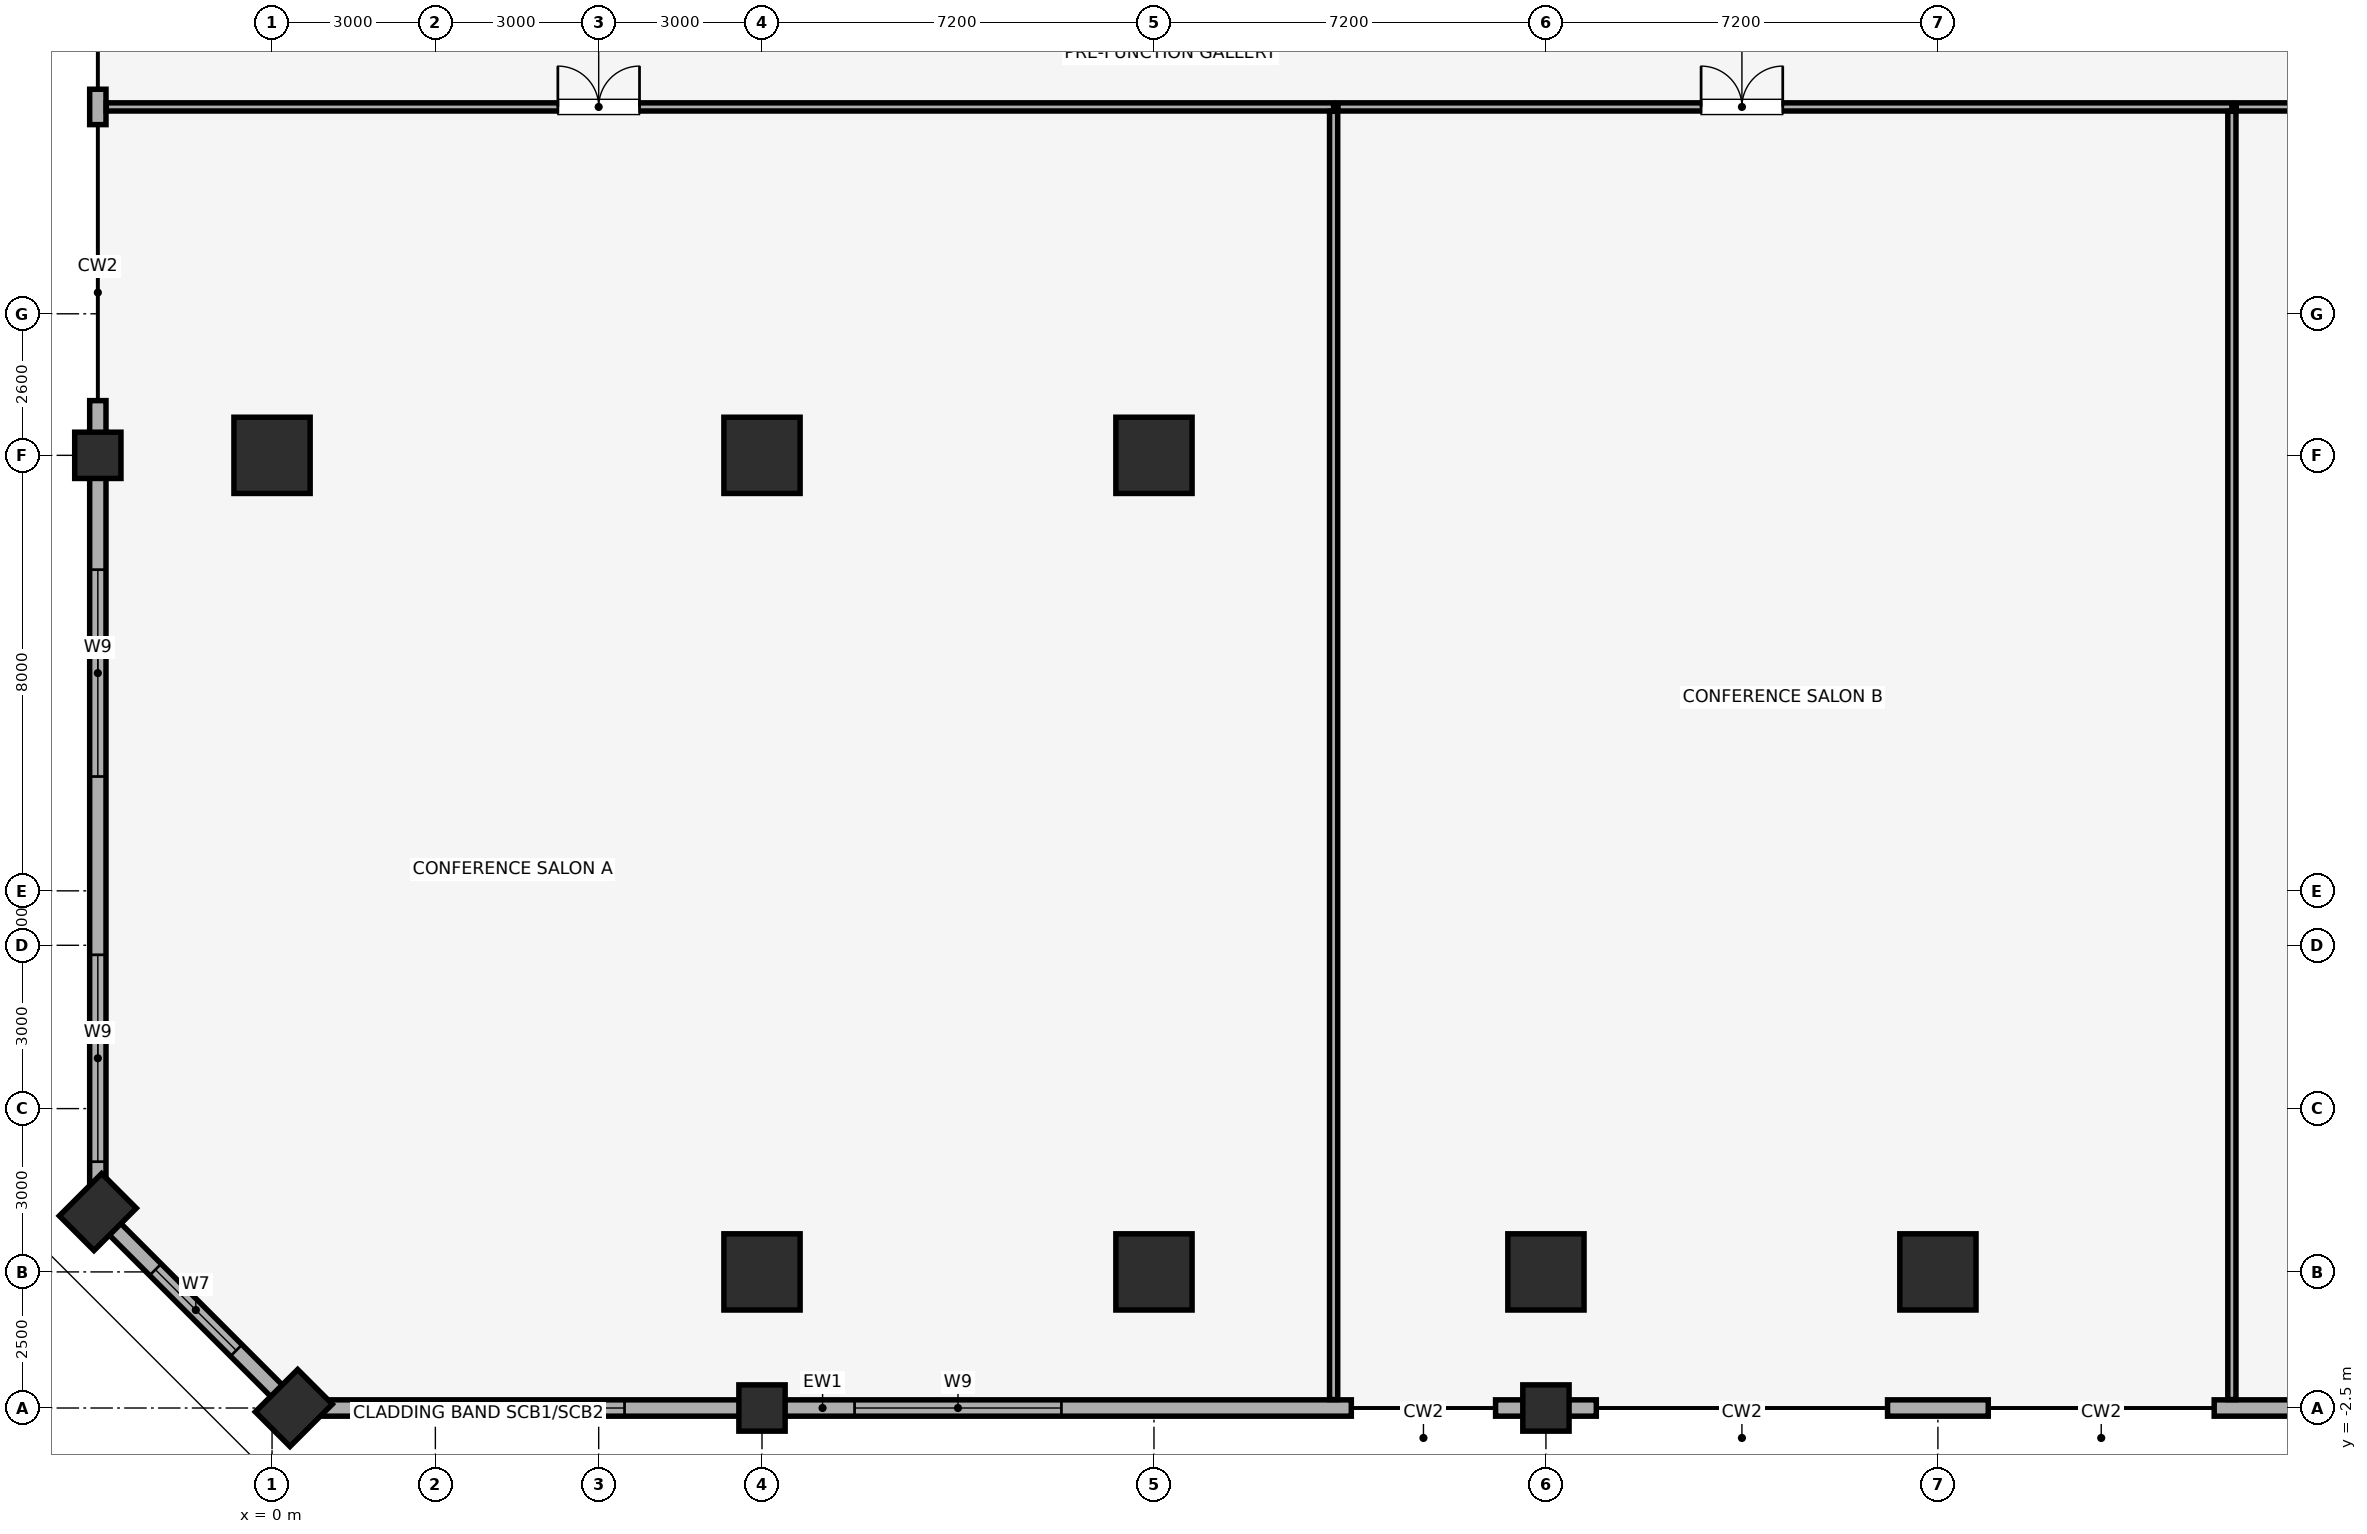
"""IFC4 building model, lengths in metres.
Left out: names, types, materials, properties, quantities, classifications, styles, units other than length and angle.
Written with IfcOpenShell. Run it as: python <this file> out.ifc"""

import sys

from ifc_helpers import new_model, si_unit, direction, frame, frame_2d, origin, origin_2d, place, context, subcontext, project, spatial, rectangle, extrude, element, fill, save


model = new_model("IFC4")
c1 = context("Model", 3, precision=1e-05, world=origin(), true_north=direction((0.0, 1.0)))
c2 = subcontext(c1, "Body", "Model", "MODEL_VIEW")
j1 = project(units=[si_unit("LENGTHUNIT", "METRE"), si_unit("PLANEANGLEUNIT", "RADIAN")], contexts=[c1])
p1 = place(None, origin())
s1 = spatial("IfcSite", under=j1, at=p1, CompositionType="ELEMENT")
p2 = place(p1, origin())
s2 = spatial("IfcBuilding", under=s1, at=p2, CompositionType="ELEMENT")
p3 = place(p2, frame((0.0, 0.0, 26.0)))
s3 = spatial("IfcBuildingStorey", under=s2, at=p3, CompositionType="ELEMENT", Elevation=26.0)
for number, where, z_axis, x_axis in (
    (1, (9.0, -2.5, 0.0), (0.0, 0.0, 1.0), (1.0, 0.0, 0.0)),
    (2, (23.4, -2.5, 0.0), (0.0, 0.0, 1.0), (1.0, 0.0, 0.0)),
    (3, (-3.2, 15.0, 0.0), (0.0, 0.0, 1.0), (1.0, 0.0, 0.0)),
):
    element("IfcColumn", number, at=place(p3, frame(where, z_axis=z_axis, x_axis=x_axis)), inside=s3, PredefinedType="COLUMN", context=c2, shape_type="SweptSolid", body=[
        extrude(rectangle(XDim=0.85, YDim=0.85, at=origin_2d()), origin(), (0.0, 0.0, 1.0), 5.16),
    ])
for number, where, z_axis, x_axis in (
    (4, (0.4, -2.5, 0.0), (0.0, 0.0, 1.0), (0.707, 0.707, 0.0)),
    (5, (-3.2, 1.1, 0.0), (0.0, 0.0, 1.0), (0.707, 0.707, 0.0)),
):
    element("IfcColumn", number, at=place(p3, frame(where, z_axis=z_axis, x_axis=x_axis)), inside=s3, PredefinedType="PILASTER", context=c2, shape_type="SweptSolid", body=[
        extrude(rectangle(XDim=1.1, YDim=0.9, at=origin_2d()), origin(), (0.0, 0.0, 1.0), 5.16),
    ])
for number, where, z_axis, x_axis in (
    (6, (9.0, 0.0, 0.0), (0.0, 0.0, 1.0), (1.0, 0.0, 0.0)),
    (7, (16.2, 0.0, 0.0), (0.0, 0.0, 1.0), (1.0, 0.0, 0.0)),
    (8, (23.4, 0.0, 0.0), (0.0, 0.0, 1.0), (1.0, 0.0, 0.0)),
    (9, (30.6, 0.0, 0.0), (0.0, 0.0, 1.0), (1.0, 0.0, 0.0)),
    (10, (9.0, 15.0, 0.0), (0.0, 0.0, 1.0), (1.0, 0.0, 0.0)),
    (11, (16.2, 15.0, 0.0), (0.0, 0.0, 1.0), (1.0, 0.0, 0.0)),
    (12, (0.0, 15.0, 0.0), (0.0, 0.0, 1.0), (1.0, 0.0, 0.0)),
):
    element("IfcColumn", number, at=place(p3, frame(where, z_axis=z_axis, x_axis=x_axis)), inside=s3, PredefinedType="COLUMN", context=c2, shape_type="SweptSolid", body=[
        extrude(rectangle(XDim=1.4, YDim=1.4, at=origin_2d()), origin(), (0.0, 0.0, 1.0), 5.16),
    ])
p4 = place(p3, frame((0.4, -2.5, 0.0), z_axis=(0.0, 0.0, 1.0), x_axis=(1.0, 0.0, 0.0)))
e13 = element("IfcWall", 13, at=p4, inside=s3, PredefinedType="SOLIDWALL", context=c2, shape_type="SweptSolid", body=[
    extrude(rectangle(XDim=19.425, YDim=0.3, at=frame_2d((9.712, 0.0))), origin(), (0.0, 0.0, 1.0), 5.12),
])
p5 = place(p4, frame((2.275, 0.0, 0.85)))
e14 = element("IfcOpeningElement", 14, at=p5, cuts=e13, PredefinedType="OPENING", context=c2, shape_type="SweptSolid", body=[
    extrude(rectangle(XDim=3.8, YDim=2.2, at=frame_2d((1.9, 1.1))), frame((0.0, 0.16, 0.0), z_axis=(0.0, -1.0, 0.0), x_axis=(1.0, 0.0, 0.0)), (0.0, 0.0, 1.0), 0.32),
])
p6 = place(p4, frame((10.3, 0.0, 0.85)))
e15 = element("IfcOpeningElement", 15, at=p6, cuts=e13, PredefinedType="OPENING", context=c2, shape_type="SweptSolid", body=[
    extrude(rectangle(XDim=3.8, YDim=2.2, at=frame_2d((1.9, 1.1))), frame((0.0, 0.16, 0.0), z_axis=(0.0, -1.0, 0.0), x_axis=(1.0, 0.0, 0.0)), (0.0, 0.0, 1.0), 0.32),
])
for number, where, z_axis, x_axis in (
    (16, (22.475, -2.5, 0.0), (0.0, 0.0, 1.0), (1.0, 0.0, 0.0)),
    (17, (29.675, -2.5, 0.0), (0.0, 0.0, 1.0), (1.0, 0.0, 0.0)),
):
    element("IfcWall", number, at=place(p3, frame(where, z_axis=z_axis, x_axis=x_axis)), inside=s3, PredefinedType="SOLIDWALL", context=c2, shape_type="SweptSolid", body=[
        extrude(rectangle(XDim=1.85, YDim=0.3, at=frame_2d((0.925, 0.0))), origin(), (0.0, 0.0, 1.0), 5.12),
    ])
p7 = place(p3, frame((35.675, -2.5, 0.0), z_axis=(0.0, 0.0, 1.0), x_axis=(1.0, 0.0, 0.0)))
e18 = element("IfcWall", 18, at=p7, inside=s3, PredefinedType="SOLIDWALL", context=c2, shape_type="SweptSolid", body=[
    extrude(rectangle(XDim=3.05, YDim=0.3, at=frame_2d((1.525, 0.0))), origin(), (0.0, 0.0, 1.0), 5.12),
])
p8 = place(p3, frame((-3.2, 21.725, 0.0), z_axis=(0.0, 0.0, 1.0), x_axis=(0.0, -1.0, 0.0)))
e19 = element("IfcWall", 19, at=p8, inside=s3, PredefinedType="SOLIDWALL", context=c2, shape_type="SweptSolid", body=[
    extrude(rectangle(XDim=0.65, YDim=0.3, at=frame_2d((0.325, 0.0))), origin(), (0.0, 0.0, 1.0), 5.12),
])
p9 = place(p3, frame((-3.2, 16.005, 0.0), z_axis=(0.0, 0.0, 1.0), x_axis=(0.0, -1.0, 0.0)))
e20 = element("IfcWall", 20, at=p9, inside=s3, PredefinedType="SOLIDWALL", context=c2, shape_type="SweptSolid", body=[
    extrude(rectangle(XDim=14.905, YDim=0.3, at=frame_2d((7.452, 0.0))), origin(), (0.0, 0.0, 1.0), 5.12),
])
p10 = place(p9, frame((10.18, 0.0, 0.85)))
e21 = element("IfcOpeningElement", 21, at=p10, cuts=e20, PredefinedType="OPENING", context=c2, shape_type="SweptSolid", body=[
    extrude(rectangle(XDim=3.8, YDim=2.2, at=frame_2d((1.9, 1.1))), frame((0.0, 0.16, 0.0), z_axis=(0.0, -1.0, 0.0), x_axis=(1.0, 0.0, 0.0)), (0.0, 0.0, 1.0), 0.32),
])
p11 = place(p9, frame((3.105, 0.0, 0.85)))
e22 = element("IfcOpeningElement", 22, at=p11, cuts=e20, PredefinedType="OPENING", context=c2, shape_type="SweptSolid", body=[
    extrude(rectangle(XDim=3.8, YDim=2.2, at=frame_2d((1.9, 1.1))), frame((0.0, 0.16, 0.0), z_axis=(0.0, -1.0, 0.0), x_axis=(1.0, 0.0, 0.0)), (0.0, 0.0, 1.0), 0.32),
])
p12 = place(p3, frame((-3.2, 1.1, 0.0), z_axis=(0.0, 0.0, 1.0), x_axis=(0.707082803744, -0.707130757816, 0.0)))
e23 = element("IfcWall", 23, at=p12, inside=s3, PredefinedType="SOLIDWALL", context=c2, shape_type="SweptSolid", body=[
    extrude(rectangle(XDim=5.091, YDim=0.3, at=frame_2d((2.545, 0.0))), origin(), (0.0, 0.0, 1.0), 5.12),
])
p13 = place(p12, frame((1.496, 0.0, 0.85)))
e24 = element("IfcOpeningElement", 24, at=p13, cuts=e23, PredefinedType="OPENING", context=c2, shape_type="SweptSolid", body=[
    extrude(rectangle(XDim=2.1, YDim=1.6, at=frame_2d((1.05, 0.8))), frame((0.0, 0.16, 0.0), z_axis=(0.0, -1.0, 0.0), x_axis=(1.0, 0.0, 0.0)), (0.0, 0.0, 1.0), 0.32),
])
p14 = place(p3, frame((-3.045, 21.4, 0.0), z_axis=(0.0, 0.0, 1.0), x_axis=(1.0, 0.0, 0.0)))
e25 = element("IfcWall", 25, at=p14, inside=s3, PredefinedType="PARTITIONING", context=c2, shape_type="SweptSolid", body=[
    extrude(rectangle(XDim=22.545, YDim=0.15, at=frame_2d((11.272, 0.0))), origin(), (0.0, 0.0, 1.0), 5.12),
])
p15 = place(p14, frame((8.295, 0.0, 0.0)))
e26 = element("IfcOpeningElement", 26, at=p15, cuts=e25, PredefinedType="OPENING", context=c2, shape_type="SweptSolid", body=[
    extrude(rectangle(XDim=1.5, YDim=2.25, at=frame_2d((0.75, 1.125))), frame((0.0, 0.085, 0.0), z_axis=(0.0, -1.0, 0.0), x_axis=(1.0, 0.0, 0.0)), (0.0, 0.0, 1.0), 0.17),
])
p16 = place(p3, frame((19.5, -2.345, 0.0), z_axis=(0.0, 0.0, 1.0), x_axis=(0.0, 1.0, 0.0)))
e27 = element("IfcWall", 27, at=p16, inside=s3, PredefinedType="PARTITIONING", context=c2, shape_type="SweptSolid", body=[
    extrude(rectangle(XDim=23.665, YDim=0.15, at=frame_2d((11.833, 0.0))), origin(), (0.0, 0.0, 1.0), 5.12),
])
p17 = place(p3, frame((19.58, 21.4, 0.0), z_axis=(0.0, 0.0, 1.0), x_axis=(1.0, 0.0, 0.0)))
e28 = element("IfcWall", 28, at=p17, inside=s3, PredefinedType="PARTITIONING", context=c2, shape_type="SweptSolid", body=[
    extrude(rectangle(XDim=16.42, YDim=0.15, at=frame_2d((8.21, 0.0))), origin(), (0.0, 0.0, 1.0), 5.12),
])
p18 = place(p17, frame((6.67, 0.0, 0.0)))
e29 = element("IfcOpeningElement", 29, at=p18, cuts=e28, PredefinedType="OPENING", context=c2, shape_type="SweptSolid", body=[
    extrude(rectangle(XDim=1.5, YDim=2.25, at=frame_2d((0.75, 1.125))), frame((0.0, 0.085, 0.0), z_axis=(0.0, -1.0, 0.0), x_axis=(1.0, 0.0, 0.0)), (0.0, 0.0, 1.0), 0.17),
])
p19 = place(p3, frame((36.0, -2.345, 0.0), z_axis=(0.0, 0.0, 1.0), x_axis=(0.0, 1.0, 0.0)))
e30 = element("IfcWall", 30, at=p19, inside=s3, PredefinedType="PARTITIONING", context=c2, shape_type="SweptSolid", body=[
    extrude(rectangle(XDim=23.665, YDim=0.15, at=frame_2d((11.833, 0.0))), origin(), (0.0, 0.0, 1.0), 5.12),
])
p20 = place(p3, frame((36.08, 21.4, 0.0), z_axis=(0.0, 0.0, 1.0), x_axis=(1.0, 0.0, 0.0)))
e31 = element("IfcWall", 31, at=p20, inside=s3, PredefinedType="PARTITIONING", context=c2, shape_type="SweptSolid", body=[
    extrude(rectangle(XDim=16.42, YDim=0.15, at=frame_2d((8.21, 0.0))), origin(), (0.0, 0.0, 1.0), 5.12),
])
p21 = place(p20, frame((5.17, 0.0, 0.0)))
e32 = element("IfcOpeningElement", 32, at=p21, cuts=e31, PredefinedType="OPENING", context=c2, shape_type="SweptSolid", body=[
    extrude(rectangle(XDim=1.5, YDim=2.25, at=frame_2d((0.75, 1.125))), frame((0.0, 0.085, 0.0), z_axis=(0.0, -1.0, 0.0), x_axis=(1.0, 0.0, 0.0)), (0.0, 0.0, 1.0), 0.17),
])
p22 = place(p13, origin())
e33 = element("IfcWindow", 33, at=p22, inside=s3, PartitioningType="SINGLE_PANEL", PredefinedType="WINDOW", context=c2, shape_type="SweptSolid", body=[
    extrude(rectangle(XDim=2.1, YDim=1.6, at=frame_2d((1.05, 0.8))), frame((0.0, 0.03, 0.0), z_axis=(0.0, -1.0, 0.0), x_axis=(1.0, 0.0, 0.0)), (0.0, 0.0, 1.0), 0.06),
])
fill(e24, e33)
p23 = place(p5, origin())
e34 = element("IfcWindow", 34, at=p23, inside=s3, PartitioningType="SINGLE_PANEL", PredefinedType="WINDOW", context=c2, shape_type="SweptSolid", body=[
    extrude(rectangle(XDim=3.8, YDim=2.2, at=frame_2d((1.9, 1.1))), frame((0.0, 0.03, 0.0), z_axis=(0.0, -1.0, 0.0), x_axis=(1.0, 0.0, 0.0)), (0.0, 0.0, 1.0), 0.06),
])
fill(e14, e34)
p24 = place(p6, origin())
e35 = element("IfcWindow", 35, at=p24, inside=s3, PartitioningType="SINGLE_PANEL", PredefinedType="WINDOW", context=c2, shape_type="SweptSolid", body=[
    extrude(rectangle(XDim=3.8, YDim=2.2, at=frame_2d((1.9, 1.1))), frame((0.0, 0.03, 0.0), z_axis=(0.0, -1.0, 0.0), x_axis=(1.0, 0.0, 0.0)), (0.0, 0.0, 1.0), 0.06),
])
fill(e15, e35)
p25 = place(p10, origin())
e36 = element("IfcWindow", 36, at=p25, inside=s3, PartitioningType="SINGLE_PANEL", PredefinedType="WINDOW", context=c2, shape_type="SweptSolid", body=[
    extrude(rectangle(XDim=3.8, YDim=2.2, at=frame_2d((1.9, 1.1))), frame((0.0, 0.03, 0.0), z_axis=(0.0, -1.0, 0.0), x_axis=(1.0, 0.0, 0.0)), (0.0, 0.0, 1.0), 0.06),
])
fill(e21, e36)
p26 = place(p11, origin())
e37 = element("IfcWindow", 37, at=p26, inside=s3, PartitioningType="SINGLE_PANEL", PredefinedType="WINDOW", context=c2, shape_type="SweptSolid", body=[
    extrude(rectangle(XDim=3.8, YDim=2.2, at=frame_2d((1.9, 1.1))), frame((0.0, 0.03, 0.0), z_axis=(0.0, -1.0, 0.0), x_axis=(1.0, 0.0, 0.0)), (0.0, 0.0, 1.0), 0.06),
])
fill(e22, e37)
p27 = place(p15, origin())
e38 = element("IfcDoor", 38, at=p27, inside=s3, OperationType="DOUBLE_DOOR_SINGLE_SWING", PredefinedType="DOOR", context=c2, shape_type="SweptSolid", body=[
    extrude(rectangle(XDim=1.5, YDim=2.25, at=frame_2d((0.75, 1.125))), frame((0.0, 0.025, 0.0), z_axis=(0.0, -1.0, 0.0), x_axis=(1.0, 0.0, 0.0)), (0.0, 0.0, 1.0), 0.05),
])
fill(e26, e38)
p28 = place(p18, origin())
e39 = element("IfcDoor", 39, at=p28, inside=s3, OperationType="DOUBLE_DOOR_SINGLE_SWING", PredefinedType="DOOR", context=c2, shape_type="SweptSolid", body=[
    extrude(rectangle(XDim=1.5, YDim=2.25, at=frame_2d((0.75, 1.125))), frame((0.0, 0.025, 0.0), z_axis=(0.0, -1.0, 0.0), x_axis=(1.0, 0.0, 0.0)), (0.0, 0.0, 1.0), 0.05),
])
fill(e29, e39)
save(model, sys.argv[1])
